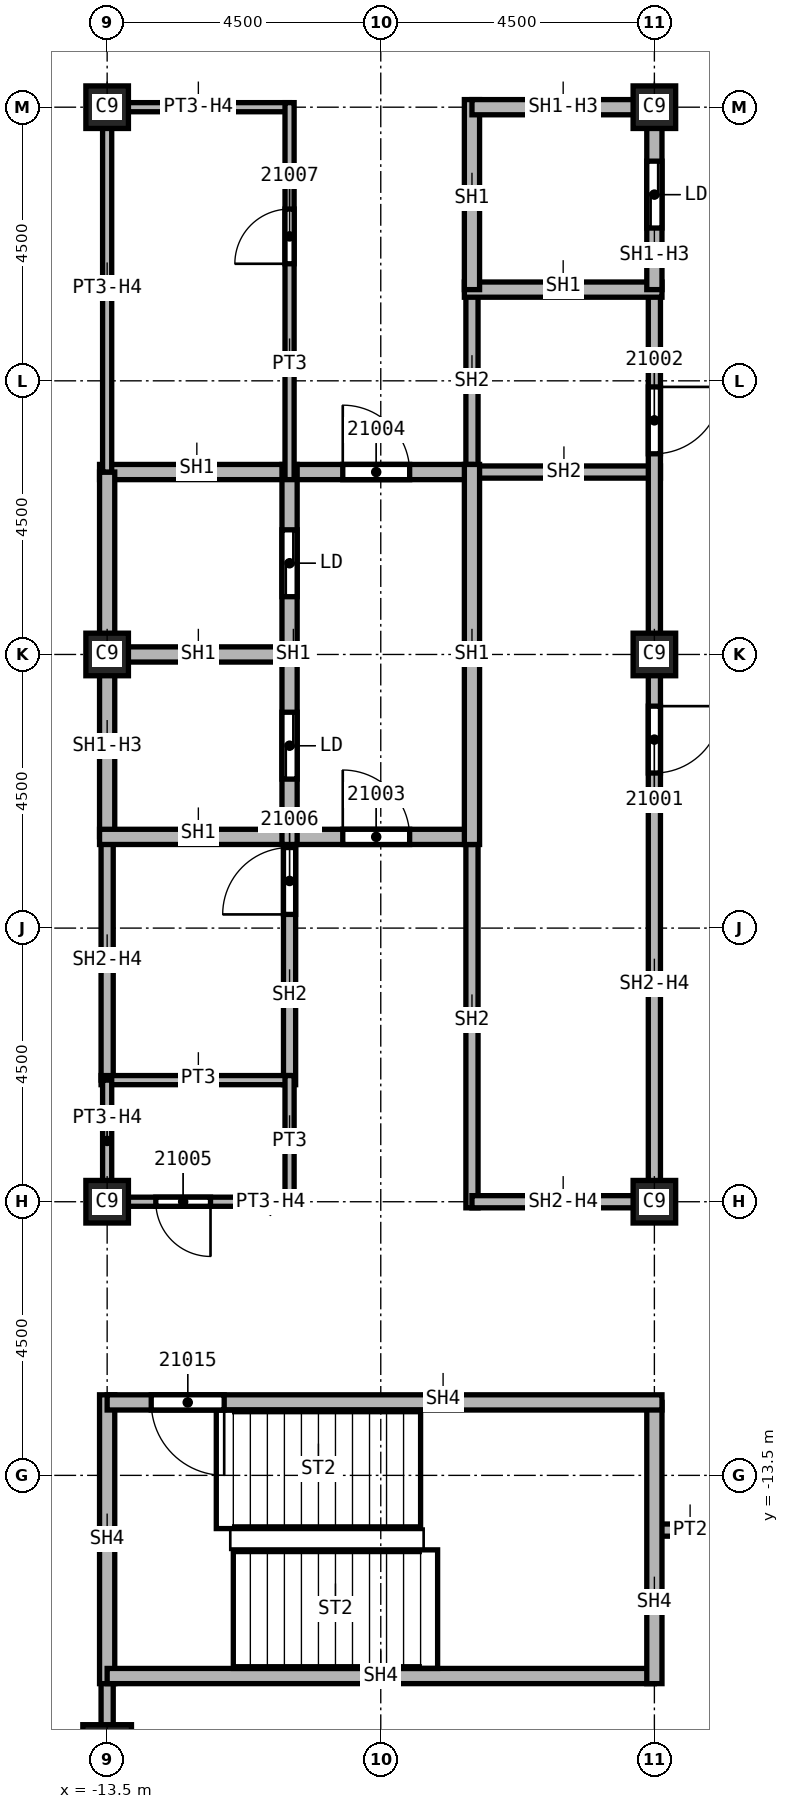
"""IFC4 building model, lengths in metres.
Left out: names, types, materials, properties, quantities, classifications, styles, units other than length and angle.
Written with IfcOpenShell. Run it as: python <this file> out.ifc"""

import sys

from ifc_helpers import new_model, si_unit, direction, frame, frame_2d, origin, origin_2d, place, context, subcontext, project, spatial, rectangle, extrude, element, fill, save


model = new_model("IFC4")
c1 = context("Model", 3, precision=1e-05, world=origin(), true_north=direction((0.0, 1.0)))
c2 = subcontext(c1, "Body", "Model", "MODEL_VIEW")
j1 = project(units=[si_unit("LENGTHUNIT", "METRE"), si_unit("PLANEANGLEUNIT", "RADIAN")], contexts=[c1])
p1 = place(None, origin())
s1 = spatial("IfcSite", under=j1, at=p1, CompositionType="ELEMENT")
p2 = place(p1, origin())
s2 = spatial("IfcBuilding", under=s1, at=p2, CompositionType="ELEMENT")
p3 = place(p2, frame((0.0, 0.0, 304.0)))
s3 = spatial("IfcBuildingStorey", under=s2, at=p3, CompositionType="ELEMENT", Elevation=304.0)
p4 = place(p3, frame((-13.5, -18.0, 0.0), z_axis=(0.0, 0.0, 1.0), x_axis=(1.0, 0.0, 0.0)))
e1 = element("IfcColumn", 1, at=p4, inside=s3, PredefinedType="COLUMN", context=c2, shape_type="SweptSolid", body=[
    extrude(rectangle(XDim=0.8, YDim=0.8, at=origin_2d()), origin(), (0.0, 0.0, 1.0), 3.74),
])
for number, where, z_axis, x_axis in (
    (2, (-4.5, 0.0, 0.0), (0.0, 0.0, 1.0), (1.0, 0.0, 0.0)),
    (3, (-4.5, 9.0, 0.0), (0.0, 0.0, 1.0), (1.0, 0.0, 0.0)),
    (4, (-4.5, -9.0, 0.0), (0.0, 0.0, 1.0), (1.0, 0.0, 0.0)),
    (5, (-13.5, 0.0, 0.0), (0.0, 0.0, 1.0), (1.0, 0.0, 0.0)),
    (6, (-13.5, 9.0, 0.0), (0.0, 0.0, 1.0), (1.0, 0.0, 0.0)),
    (7, (-13.5, -9.0, 0.0), (0.0, 0.0, 1.0), (1.0, 0.0, 0.0)),
):
    element("IfcColumn", number, at=place(p3, frame(where, z_axis=z_axis, x_axis=x_axis)), inside=s3, PredefinedType="COLUMN", context=c2, shape_type="SweptSolid", body=[
        extrude(rectangle(XDim=0.7, YDim=0.7, at=origin_2d()), origin(), (0.0, 0.0, 1.0), 3.74),
    ])
p5 = place(p3, frame((-13.5, -16.675, 0.0), z_axis=(0.0, 0.0, 1.0), x_axis=(0.0, -1.0, 0.0)))
e8 = element("IfcWall", 8, at=p5, inside=s3, PredefinedType="PARTITIONING", context=c2, shape_type="SweptSolid", body=[
    extrude(rectangle(XDim=6.275, YDim=0.2, at=frame_2d((3.137, 0.0))), origin(), (0.0, 0.0, 1.0), 3.74),
])
p6 = place(p5, frame((2.2, 0.0, 0.0)))
e9 = element("IfcOpeningElement", 9, at=p6, cuts=e8, PredefinedType="OPENING", context=c2, shape_type="SweptSolid", body=[
    extrude(rectangle(XDim=1.0, YDim=2.1, at=frame_2d((0.5, 1.05))), frame((0.0, 0.1, 0.0), z_axis=(0.0, -1.0, 0.0), x_axis=(1.0, 0.0, 0.0)), (0.0, 0.0, 1.0), 0.2),
])
p7 = place(p3, frame((-3.45, -14.4, 0.0), z_axis=(0.0, 0.0, 1.0), x_axis=(-1.0, 0.0, 0.0)))
e10 = element("IfcWall", 10, at=p7, inside=s3, PredefinedType="PARTITIONING", context=c2, shape_type="SweptSolid", body=[
    extrude(rectangle(XDim=1.05, YDim=0.2, at=frame_2d((0.525, 0.0))), origin(), (0.0, 0.0, 1.0), 3.74),
])
p8 = place(p3, frame((-13.5, -7.0, 0.0), z_axis=(0.0, 0.0, 1.0), x_axis=(0.0, 1.0, 0.0)))
e11 = element("IfcWall", 11, at=p8, inside=s3, PredefinedType="SOLIDWALL", context=c2, shape_type="SweptSolid", body=[
    extrude(rectangle(XDim=4.0, YDim=0.2, at=frame_2d((2.0, 0.0))), origin(), (0.0, 0.0, 1.0), 3.062),
])
p9 = place(p3, frame((-10.5, -7.075, 0.0), z_axis=(0.0, 0.0, 1.0), x_axis=(0.0, 1.0, 0.0)))
e12 = element("IfcWall", 12, at=p9, inside=s3, PredefinedType="SOLIDWALL", context=c2, shape_type="SweptSolid", body=[
    extrude(rectangle(XDim=4.2, YDim=0.2, at=frame_2d((2.1, 0.0))), origin(), (0.0, 0.0, 1.0), 3.74),
])
p10 = place(p9, frame((2.8, 0.0, 0.0)))
e13 = element("IfcOpeningElement", 13, at=p10, cuts=e12, PredefinedType="OPENING", context=c2, shape_type="SweptSolid", body=[
    extrude(rectangle(XDim=1.1, YDim=2.1, at=frame_2d((0.55, 1.05))), frame((0.0, 0.1, 0.0), z_axis=(0.0, -1.0, 0.0), x_axis=(1.0, 0.0, 0.0)), (0.0, 0.0, 1.0), 0.2),
])
p11 = place(p3, frame((-7.625, 3.0, 0.0), z_axis=(0.0, 0.0, 1.0), x_axis=(1.0, 0.0, 0.0)))
e14 = element("IfcWall", 14, at=p11, inside=s3, PredefinedType="SOLIDWALL", context=c2, shape_type="SweptSolid", body=[
    extrude(rectangle(XDim=3.225, YDim=0.2, at=frame_2d((1.613, 0.0))), origin(), (0.0, 0.0, 1.0), 3.74),
])
p12 = place(p3, frame((-7.5, -9.1, 0.0), z_axis=(0.0, 0.0, 1.0), x_axis=(0.0, 1.0, 0.0)))
e15 = element("IfcWall", 15, at=p12, inside=s3, PredefinedType="SOLIDWALL", context=c2, shape_type="SweptSolid", body=[
    extrude(rectangle(XDim=6.225, YDim=0.2, at=frame_2d((3.113, 0.0))), origin(), (0.0, 0.0, 1.0), 3.74),
])
p13 = place(p3, frame((-7.5, 2.875, 0.0), z_axis=(0.0, 0.0, 1.0), x_axis=(0.0, 1.0, 0.0)))
e16 = element("IfcWall", 16, at=p13, inside=s3, PredefinedType="SOLIDWALL", context=c2, shape_type="SweptSolid", body=[
    extrude(rectangle(XDim=3.125, YDim=0.2, at=frame_2d((1.562, 0.0))), origin(), (0.0, 0.0, 1.0), 3.74),
])
p14 = place(p3, frame((-4.5, -9.0, 0.0), z_axis=(0.0, 0.0, 1.0), x_axis=(-1.0, 0.0, 0.0)))
e17 = element("IfcWall", 17, at=p14, inside=s3, PredefinedType="SOLIDWALL", context=c2, shape_type="SweptSolid", body=[
    extrude(rectangle(XDim=3.0, YDim=0.2, at=frame_2d((1.5, 0.0))), origin(), (0.0, 0.0, 1.0), 3.062),
])
p15 = place(p3, frame((-4.5, 6.0, 0.0), z_axis=(0.0, 0.0, 1.0), x_axis=(0.0, -1.0, 0.0)))
e18 = element("IfcWall", 18, at=p15, inside=s3, PredefinedType="SOLIDWALL", context=c2, shape_type="SweptSolid", body=[
    extrude(rectangle(XDim=15.1, YDim=0.2, at=frame_2d((7.55, 0.0))), origin(), (0.0, 0.0, 1.0), 3.062),
])
p16 = place(p15, frame((6.85, 0.0, 0.0)))
e19 = element("IfcOpeningElement", 19, at=p16, cuts=e18, PredefinedType="OPENING", context=c2, shape_type="SweptSolid", body=[
    extrude(rectangle(XDim=1.1, YDim=2.1, at=frame_2d((0.55, 1.05))), frame((0.0, 0.1, 0.0), z_axis=(0.0, -1.0, 0.0), x_axis=(1.0, 0.0, 0.0)), (0.0, 0.0, 1.0), 0.2),
])
p17 = place(p15, frame((1.6, 0.0, 0.0)))
e20 = element("IfcOpeningElement", 20, at=p17, cuts=e18, PredefinedType="OPENING", context=c2, shape_type="SweptSolid", body=[
    extrude(rectangle(XDim=1.1, YDim=2.1, at=frame_2d((0.55, 1.05))), frame((0.0, 0.1, 0.0), z_axis=(0.0, -1.0, 0.0), x_axis=(1.0, 0.0, 0.0)), (0.0, 0.0, 1.0), 0.2),
])
p18 = place(p3, frame((-13.625, 0.0, 0.0), z_axis=(0.0, 0.0, 1.0), x_axis=(1.0, 0.0, 0.0)))
e21 = element("IfcWall", 21, at=p18, inside=s3, PredefinedType="SOLIDWALL", context=c2, shape_type="SweptSolid", body=[
    extrude(rectangle(XDim=3.125, YDim=0.25, at=frame_2d((1.562, 0.0))), origin(), (0.0, 0.0, 1.0), 3.74),
])
p19 = place(p3, frame((-13.625, 3.0, 0.0), z_axis=(0.0, 0.0, 1.0), x_axis=(1.0, 0.0, 0.0)))
e22 = element("IfcWall", 22, at=p19, inside=s3, PredefinedType="SOLIDWALL", context=c2, shape_type="SweptSolid", body=[
    extrude(rectangle(XDim=6.125, YDim=0.25, at=frame_2d((3.062, 0.0))), origin(), (0.0, 0.0, 1.0), 3.74),
])
p20 = place(p19, frame((4.0, 0.0, 0.0)))
e23 = element("IfcOpeningElement", 23, at=p20, cuts=e22, PredefinedType="OPENING", context=c2, shape_type="SweptSolid", body=[
    extrude(rectangle(XDim=1.1, YDim=2.1, at=frame_2d((0.55, 1.05))), frame((0.0, 0.125, 0.0), z_axis=(0.0, -1.0, 0.0), x_axis=(1.0, 0.0, 0.0)), (0.0, 0.0, 1.0), 0.25),
])
p21 = place(p3, frame((-13.5, -3.0, 0.0), z_axis=(0.0, 0.0, 1.0), x_axis=(0.0, 1.0, 0.0)))
e24 = element("IfcWall", 24, at=p21, inside=s3, PredefinedType="SOLIDWALL", context=c2, shape_type="SweptSolid", body=[
    extrude(rectangle(XDim=6.0, YDim=0.25, at=frame_2d((3.0, 0.0))), origin(), (0.0, 0.0, 1.0), 3.062),
])
p22 = place(p3, frame((-13.625, -3.0, 0.0), z_axis=(0.0, 0.0, 1.0), x_axis=(1.0, 0.0, 0.0)))
e25 = element("IfcWall", 25, at=p22, inside=s3, PredefinedType="SOLIDWALL", context=c2, shape_type="SweptSolid", body=[
    extrude(rectangle(XDim=6.125, YDim=0.25, at=frame_2d((3.062, 0.0))), origin(), (0.0, 0.0, 1.0), 3.74),
])
p23 = place(p22, frame((4.0, 0.0, 0.0)))
e26 = element("IfcOpeningElement", 26, at=p23, cuts=e25, PredefinedType="OPENING", context=c2, shape_type="SweptSolid", body=[
    extrude(rectangle(XDim=1.1, YDim=2.1, at=frame_2d((0.55, 1.05))), frame((0.0, 0.125, 0.0), z_axis=(0.0, -1.0, 0.0), x_axis=(1.0, 0.0, 0.0)), (0.0, 0.0, 1.0), 0.25),
])
p24 = place(p3, frame((-10.5, -3.125, 0.0), z_axis=(0.0, 0.0, 1.0), x_axis=(0.0, 1.0, 0.0)))
e27 = element("IfcWall", 27, at=p24, inside=s3, PredefinedType="SOLIDWALL", context=c2, shape_type="SweptSolid", body=[
    extrude(rectangle(XDim=6.25, YDim=0.25, at=frame_2d((3.125, 0.0))), origin(), (0.0, 0.0, 1.0), 3.74),
])
p25 = place(p24, frame((1.075, 0.0, 0.0)))
e28 = element("IfcOpeningElement", 28, at=p25, cuts=e27, PredefinedType="OPENING", context=c2, shape_type="SweptSolid", body=[
    extrude(rectangle(XDim=1.1, YDim=2.1, at=frame_2d((0.55, 1.05))), frame((0.0, 0.125, 0.0), z_axis=(0.0, -1.0, 0.0), x_axis=(1.0, 0.0, 0.0)), (0.0, 0.0, 1.0), 0.25),
])
p26 = place(p24, frame((4.075, 0.0, 0.0)))
e29 = element("IfcOpeningElement", 29, at=p26, cuts=e27, PredefinedType="OPENING", context=c2, shape_type="SweptSolid", body=[
    extrude(rectangle(XDim=1.1, YDim=2.1, at=frame_2d((0.55, 1.05))), frame((0.0, 0.125, 0.0), z_axis=(0.0, -1.0, 0.0), x_axis=(1.0, 0.0, 0.0)), (0.0, 0.0, 1.0), 0.25),
])
p27 = place(p3, frame((-7.625, 6.0, 0.0), z_axis=(0.0, 0.0, 1.0), x_axis=(1.0, 0.0, 0.0)))
e30 = element("IfcWall", 30, at=p27, inside=s3, PredefinedType="SOLIDWALL", context=c2, shape_type="SweptSolid", body=[
    extrude(rectangle(XDim=3.25, YDim=0.25, at=frame_2d((1.625, 0.0))), origin(), (0.0, 0.0, 1.0), 3.74),
])
p28 = place(p3, frame((-7.5, -3.125, 0.0), z_axis=(0.0, 0.0, 1.0), x_axis=(0.0, 1.0, 0.0)))
e31 = element("IfcWall", 31, at=p28, inside=s3, PredefinedType="SOLIDWALL", context=c2, shape_type="SweptSolid", body=[
    extrude(rectangle(XDim=6.25, YDim=0.25, at=frame_2d((3.125, 0.0))), origin(), (0.0, 0.0, 1.0), 3.74),
])
p29 = place(p3, frame((-7.5, 6.0, 0.0), z_axis=(0.0, 0.0, 1.0), x_axis=(0.0, 1.0, 0.0)))
e32 = element("IfcWall", 32, at=p29, inside=s3, PredefinedType="SOLIDWALL", context=c2, shape_type="SweptSolid", body=[
    extrude(rectangle(XDim=3.125, YDim=0.25, at=frame_2d((1.562, 0.0))), origin(), (0.0, 0.0, 1.0), 3.74),
])
p30 = place(p3, frame((-7.5, 9.0, 0.0), z_axis=(0.0, 0.0, 1.0), x_axis=(1.0, 0.0, 0.0)))
e33 = element("IfcWall", 33, at=p30, inside=s3, PredefinedType="SOLIDWALL", context=c2, shape_type="SweptSolid", body=[
    extrude(rectangle(XDim=3.0, YDim=0.25, at=frame_2d((1.5, 0.0))), origin(), (0.0, 0.0, 1.0), 3.062),
])
p31 = place(p3, frame((-4.5, 9.125, 0.0), z_axis=(0.0, 0.0, 1.0), x_axis=(0.0, -1.0, 0.0)))
e34 = element("IfcWall", 34, at=p31, inside=s3, PredefinedType="SOLIDWALL", context=c2, shape_type="SweptSolid", body=[
    extrude(rectangle(XDim=3.125, YDim=0.25, at=frame_2d((1.562, 0.0))), origin(), (0.0, 0.0, 1.0), 3.062),
])
p32 = place(p31, frame((1.012, 0.0, 0.0)))
e35 = element("IfcOpeningElement", 35, at=p32, cuts=e34, PredefinedType="OPENING", context=c2, shape_type="SweptSolid", body=[
    extrude(rectangle(XDim=1.1, YDim=2.1, at=frame_2d((0.55, 1.05))), frame((0.0, 0.125, 0.0), z_axis=(0.0, -1.0, 0.0), x_axis=(1.0, 0.0, 0.0)), (0.0, 0.0, 1.0), 0.25),
])
p33 = place(p3, frame((-13.5, -12.175, 0.0), z_axis=(0.0, 0.0, 1.0), x_axis=(0.0, -1.0, 0.0)))
e36 = element("IfcWall", 36, at=p33, inside=s3, PredefinedType="SOLIDWALL", context=c2, shape_type="SweptSolid", body=[
    extrude(rectangle(XDim=4.75, YDim=0.25, at=frame_2d((2.375, 0.0))), origin(), (0.0, 0.0, 1.0), 3.74),
])
p34 = place(p3, frame((-4.5, -16.8, 0.0), z_axis=(0.0, 0.0, 1.0), x_axis=(-1.0, 0.0, 0.0)))
e37 = element("IfcWall", 37, at=p34, inside=s3, PredefinedType="SOLIDWALL", context=c2, shape_type="SweptSolid", body=[
    extrude(rectangle(XDim=9.0, YDim=0.25, at=frame_2d((4.5, 0.0))), origin(), (0.0, 0.0, 1.0), 3.74),
])
p35 = place(p3, frame((-4.5, -12.3, 0.0), z_axis=(0.0, 0.0, 1.0), x_axis=(0.0, -1.0, 0.0)))
e38 = element("IfcWall", 38, at=p35, inside=s3, PredefinedType="SOLIDWALL", context=c2, shape_type="SweptSolid", body=[
    extrude(rectangle(XDim=4.625, YDim=0.25, at=frame_2d((2.312, 0.0))), origin(), (0.0, 0.0, 1.0), 3.74),
])
p36 = place(p3, frame((-4.375, -12.3, 0.0), z_axis=(0.0, 0.0, 1.0), x_axis=(-1.0, 0.0, 0.0)))
e39 = element("IfcWall", 39, at=p36, inside=s3, PredefinedType="SOLIDWALL", context=c2, shape_type="SweptSolid", body=[
    extrude(rectangle(XDim=9.125, YDim=0.25, at=frame_2d((4.562, 0.0))), origin(), (0.0, 0.0, 1.0), 3.74),
])
p37 = place(p36, frame((7.2, 0.0, 0.0)))
e40 = element("IfcOpeningElement", 40, at=p37, cuts=e39, PredefinedType="OPENING", context=c2, shape_type="SweptSolid", body=[
    extrude(rectangle(XDim=1.2, YDim=2.1, at=frame_2d((0.6, 1.05))), frame((0.0, 0.125, 0.0), z_axis=(0.0, -1.0, 0.0), x_axis=(1.0, 0.0, 0.0)), (0.0, 0.0, 1.0), 0.25),
])
p38 = place(p3, frame((-13.6, -7.0, 0.0), z_axis=(0.0, 0.0, 1.0), x_axis=(1.0, 0.0, 0.0)))
e41 = element("IfcWall", 41, at=p38, inside=s3, PredefinedType="PARTITIONING", context=c2, shape_type="SweptSolid", body=[
    extrude(rectangle(XDim=3.1, YDim=0.15, at=frame_2d((1.55, 0.0))), origin(), (0.0, 0.0, 1.0), 3.74),
])
p39 = place(p3, frame((-13.5, -9.075, 0.0), z_axis=(0.0, 0.0, 1.0), x_axis=(0.0, 1.0, 0.0)))
e42 = element("IfcWall", 42, at=p39, inside=s3, PredefinedType="PARTITIONING", context=c2, shape_type="SweptSolid", body=[
    extrude(rectangle(XDim=2.075, YDim=0.15, at=frame_2d((1.038, 0.0))), origin(), (0.0, 0.0, 1.0), 3.062),
])
p40 = place(p3, frame((-13.5, 3.0, 0.0), z_axis=(0.0, 0.0, 1.0), x_axis=(0.0, 1.0, 0.0)))
e43 = element("IfcWall", 43, at=p40, inside=s3, PredefinedType="PARTITIONING", context=c2, shape_type="SweptSolid", body=[
    extrude(rectangle(XDim=6.075, YDim=0.15, at=frame_2d((3.038, 0.0))), origin(), (0.0, 0.0, 1.0), 3.062),
])
p41 = place(p3, frame((-13.5, 9.0, 0.0), z_axis=(0.0, 0.0, 1.0), x_axis=(1.0, 0.0, 0.0)))
e44 = element("IfcWall", 44, at=p41, inside=s3, PredefinedType="PARTITIONING", context=c2, shape_type="SweptSolid", body=[
    extrude(rectangle(XDim=3.0, YDim=0.15, at=frame_2d((1.5, 0.0))), origin(), (0.0, 0.0, 1.0), 3.062),
])
p42 = place(p3, frame((-10.5, -9.075, 0.0), z_axis=(0.0, 0.0, 1.0), x_axis=(0.0, 1.0, 0.0)))
e45 = element("IfcWall", 45, at=p42, inside=s3, PredefinedType="PARTITIONING", context=c2, shape_type="SweptSolid", body=[
    extrude(rectangle(XDim=2.15, YDim=0.15, at=frame_2d((1.075, 0.0))), origin(), (0.0, 0.0, 1.0), 3.74),
])
p43 = place(p3, frame((-10.5, -9.0, 0.0), z_axis=(0.0, 0.0, 1.0), x_axis=(-1.0, 0.0, 0.0)))
e46 = element("IfcWall", 46, at=p43, inside=s3, PredefinedType="PARTITIONING", context=c2, shape_type="SweptSolid", body=[
    extrude(rectangle(XDim=3.0, YDim=0.15, at=frame_2d((1.5, 0.0))), origin(), (0.0, 0.0, 1.0), 3.062),
])
p44 = place(p43, frame((1.3, 0.0, 0.0)))
e47 = element("IfcOpeningElement", 47, at=p44, cuts=e46, PredefinedType="OPENING", context=c2, shape_type="SweptSolid", body=[
    extrude(rectangle(XDim=0.9, YDim=2.1, at=frame_2d((0.45, 1.05))), frame((0.0, 0.075, 0.0), z_axis=(0.0, -1.0, 0.0), x_axis=(1.0, 0.0, 0.0)), (0.0, 0.0, 1.0), 0.15),
])
p45 = place(p3, frame((-10.5, 2.875, 0.0), z_axis=(0.0, 0.0, 1.0), x_axis=(0.0, 1.0, 0.0)))
e48 = element("IfcWall", 48, at=p45, inside=s3, PredefinedType="PARTITIONING", context=c2, shape_type="SweptSolid", body=[
    extrude(rectangle(XDim=6.2, YDim=0.15, at=frame_2d((3.1, 0.0))), origin(), (0.0, 0.0, 1.0), 3.74),
])
p46 = place(p45, frame((3.55, 0.0, 0.0)))
e49 = element("IfcOpeningElement", 49, at=p46, cuts=e48, PredefinedType="OPENING", context=c2, shape_type="SweptSolid", body=[
    extrude(rectangle(XDim=0.9, YDim=2.1, at=frame_2d((0.45, 1.05))), frame((0.0, 0.075, 0.0), z_axis=(0.0, -1.0, 0.0), x_axis=(1.0, 0.0, 0.0)), (0.0, 0.0, 1.0), 0.15),
])
p47 = place(p16, origin())
e50 = element("IfcDoor", 50, at=p47, inside=s3, OperationType="SINGLE_SWING_RIGHT", PredefinedType="DOOR", context=c2, shape_type="SweptSolid", body=[
    extrude(rectangle(XDim=1.1, YDim=2.1, at=frame_2d((0.55, 1.05))), frame((0.0, 0.025, 0.0), z_axis=(0.0, -1.0, 0.0), x_axis=(1.0, 0.0, 0.0)), (0.0, 0.0, 1.0), 0.05),
])
fill(e19, e50)
p48 = place(p17, origin())
e51 = element("IfcDoor", 51, at=p48, inside=s3, OperationType="SINGLE_SWING_LEFT", PredefinedType="DOOR", context=c2, shape_type="SweptSolid", body=[
    extrude(rectangle(XDim=1.1, YDim=2.1, at=frame_2d((0.55, 1.05))), frame((0.0, 0.025, 0.0), z_axis=(0.0, -1.0, 0.0), x_axis=(1.0, 0.0, 0.0)), (0.0, 0.0, 1.0), 0.05),
])
fill(e20, e51)
p49 = place(p23, origin())
e52 = element("IfcDoor", 52, at=p49, inside=s3, OperationType="SINGLE_SWING_RIGHT", PredefinedType="DOOR", context=c2, shape_type="SweptSolid", body=[
    extrude(rectangle(XDim=1.1, YDim=2.1, at=frame_2d((0.55, 1.05))), frame((0.0, 0.025, 0.0), z_axis=(0.0, -1.0, 0.0), x_axis=(1.0, 0.0, 0.0)), (0.0, 0.0, 1.0), 0.05),
])
fill(e26, e52)
p50 = place(p20, origin())
e53 = element("IfcDoor", 53, at=p50, inside=s3, OperationType="SINGLE_SWING_LEFT", PredefinedType="DOOR", context=c2, shape_type="SweptSolid", body=[
    extrude(rectangle(XDim=1.1, YDim=2.1, at=frame_2d((0.55, 1.05))), frame((0.0, 0.025, 0.0), z_axis=(0.0, -1.0, 0.0), x_axis=(1.0, 0.0, 0.0)), (0.0, 0.0, 1.0), 0.05),
])
fill(e23, e53)
p51 = place(p44, origin())
e54 = element("IfcDoor", 54, at=p51, inside=s3, OperationType="SINGLE_SWING_RIGHT", PredefinedType="DOOR", context=c2, shape_type="SweptSolid", body=[
    extrude(rectangle(XDim=0.9, YDim=2.1, at=frame_2d((0.45, 1.05))), frame((0.0, 0.025, 0.0), z_axis=(0.0, -1.0, 0.0), x_axis=(1.0, 0.0, 0.0)), (0.0, 0.0, 1.0), 0.05),
])
fill(e47, e54)
p52 = place(p10, origin())
e55 = element("IfcDoor", 55, at=p52, inside=s3, OperationType="SINGLE_SWING_LEFT", PredefinedType="DOOR", context=c2, shape_type="SweptSolid", body=[
    extrude(rectangle(XDim=1.1, YDim=2.1, at=frame_2d((0.55, 1.05))), frame((0.0, 0.025, 0.0), z_axis=(0.0, -1.0, 0.0), x_axis=(1.0, 0.0, 0.0)), (0.0, 0.0, 1.0), 0.05),
])
fill(e13, e55)
p53 = place(p46, origin())
e56 = element("IfcDoor", 56, at=p53, inside=s3, OperationType="SINGLE_SWING_RIGHT", PredefinedType="DOOR", context=c2, shape_type="SweptSolid", body=[
    extrude(rectangle(XDim=0.9, YDim=2.1, at=frame_2d((0.45, 1.05))), frame((0.0, 0.025, 0.0), z_axis=(0.0, -1.0, 0.0), x_axis=(1.0, 0.0, 0.0)), (0.0, 0.0, 1.0), 0.05),
])
fill(e49, e56)
p54 = place(p37, origin())
e57 = element("IfcDoor", 57, at=p54, inside=s3, OperationType="SINGLE_SWING_RIGHT", PredefinedType="DOOR", context=c2, shape_type="SweptSolid", body=[
    extrude(rectangle(XDim=1.2, YDim=2.1, at=frame_2d((0.6, 1.05))), frame((0.0, 0.025, 0.0), z_axis=(0.0, -1.0, 0.0), x_axis=(1.0, 0.0, 0.0)), (0.0, 0.0, 1.0), 0.05),
])
fill(e40, e57)
p55 = place(p32, origin())
e58 = element("IfcDoor", 58, at=p55, inside=s3, OperationType="SLIDING_TO_LEFT", PredefinedType="DOOR", context=c2, shape_type="SweptSolid", body=[
    extrude(rectangle(XDim=1.1, YDim=2.1, at=frame_2d((0.55, 1.05))), frame((0.0, 0.025, 0.0), z_axis=(0.0, -1.0, 0.0), x_axis=(1.0, 0.0, 0.0)), (0.0, 0.0, 1.0), 0.05),
])
fill(e35, e58)
p56 = place(p25, origin())
e59 = element("IfcDoor", 59, at=p56, inside=s3, OperationType="SLIDING_TO_LEFT", PredefinedType="DOOR", context=c2, shape_type="SweptSolid", body=[
    extrude(rectangle(XDim=1.1, YDim=2.1, at=frame_2d((0.55, 1.05))), frame((0.0, 0.025, 0.0), z_axis=(0.0, -1.0, 0.0), x_axis=(1.0, 0.0, 0.0)), (0.0, 0.0, 1.0), 0.05),
])
fill(e28, e59)
p57 = place(p26, origin())
e60 = element("IfcDoor", 60, at=p57, inside=s3, OperationType="SLIDING_TO_LEFT", PredefinedType="DOOR", context=c2, shape_type="SweptSolid", body=[
    extrude(rectangle(XDim=1.1, YDim=2.1, at=frame_2d((0.55, 1.05))), frame((0.0, 0.025, 0.0), z_axis=(0.0, -1.0, 0.0), x_axis=(1.0, 0.0, 0.0)), (0.0, 0.0, 1.0), 0.05),
])
fill(e29, e60)
save(model, sys.argv[1])
